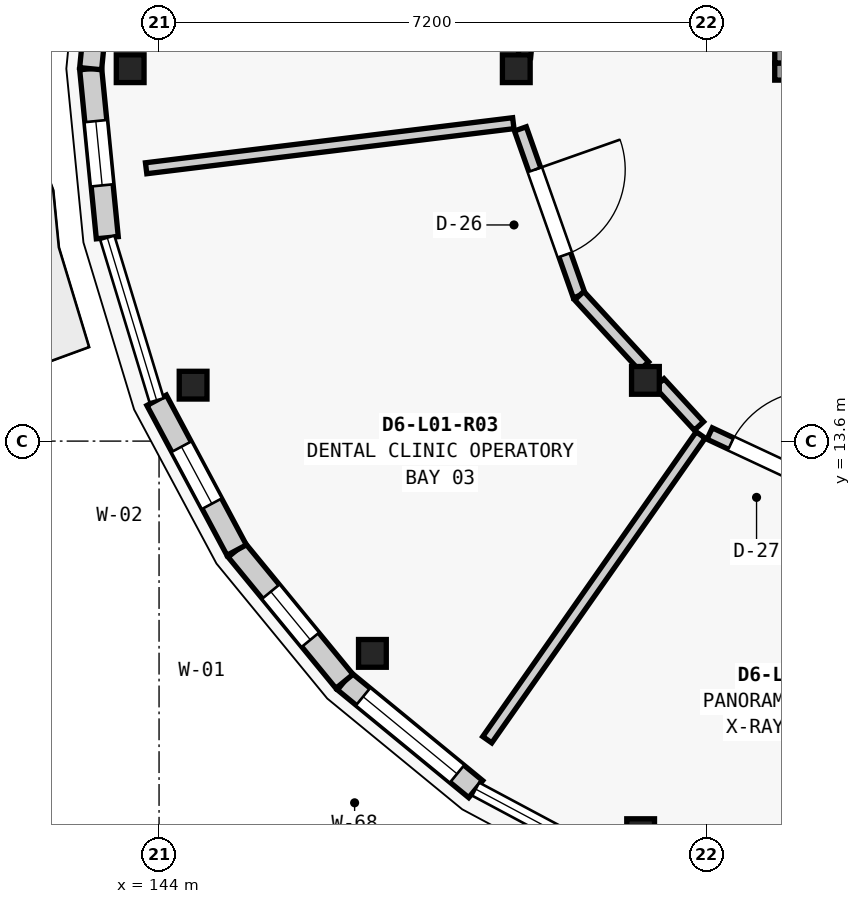
"""IFC4 building model, lengths in metres.
Left out: names, types, materials, properties, quantities, classifications, styles, units other than length and angle.
Written with IfcOpenShell. Run it as: python <this file> out.ifc"""

import sys

from ifc_helpers import new_model, si_unit, direction, frame, frame_2d, origin, origin_2d, place, context, subcontext, project, spatial, rectangle, extrude, element, fill, save


model = new_model("IFC4")
c1 = context("Model", 3, precision=1e-05, world=origin(), true_north=direction((0.0, 1.0)))
c2 = subcontext(c1, "Body", "Model", "MODEL_VIEW")
j1 = project(units=[si_unit("LENGTHUNIT", "METRE"), si_unit("PLANEANGLEUNIT", "RADIAN")], contexts=[c1])
p1 = place(None, origin())
s1 = spatial("IfcSite", under=j1, at=p1, CompositionType="ELEMENT")
p2 = place(p1, origin())
s2 = spatial("IfcBuilding", under=s1, at=p2, CompositionType="ELEMENT")
p3 = place(p2, frame((0.0, 0.0, 4.55)))
s3 = spatial("IfcBuildingStorey", under=s2, at=p3, CompositionType="ELEMENT", Elevation=4.55)
for number, where, z_axis, x_axis in (
    (1, (143.62, 18.5, 0.0), (0.0, 0.0, 1.0), (1.0, 0.0, 0.0)),
    (2, (144.448, 14.336, 0.0), (0.0, 0.0, 1.0), (1.0, 0.0, 0.0)),
    (3, (146.807, 10.807, 0.0), (0.0, 0.0, 1.0), (1.0, 0.0, 0.0)),
    (4, (150.336, 8.448, 0.0), (0.0, 0.0, 1.0), (1.0, 0.0, 0.0)),
    (5, (148.7, 18.5, 0.0), (0.0, 0.0, 1.0), (1.0, 0.0, 0.0)),
    (6, (150.399, 14.399, 0.0), (0.0, 0.0, 1.0), (1.0, 0.0, 0.0)),
):
    element("IfcColumn", number, at=place(p3, frame(where, z_axis=z_axis, x_axis=x_axis)), inside=s3, PredefinedType="COLUMN", context=c2, shape_type="SweptSolid", body=[
        extrude(rectangle(XDim=0.365, YDim=0.365, at=origin_2d()), origin(), (0.0, 0.0, 1.0), 4.2),
    ])
p4 = place(p3, frame((148.166, 9.021, 0.0), z_axis=(0.0, 0.0, 1.0), x_axis=(-0.772875513354, 0.63455767339, 0.0)))
e7 = element("IfcWall", 7, at=p4, inside=s3, PredefinedType="ELEMENTEDWALL", context=c2, shape_type="SweptSolid", body=[
    extrude(rectangle(XDim=2.235, YDim=0.29, at=frame_2d((1.117, 0.0))), origin(), (0.0, 0.0, 1.0), 3.309),
])
p5 = place(p4, frame((0.317, 0.0, 0.85)))
e8 = element("IfcOpeningElement", 8, at=p5, cuts=e7, PredefinedType="OPENING", context=c2, shape_type="SweptSolid", body=[
    extrude(rectangle(XDim=1.6, YDim=1.85, at=frame_2d((0.8, 0.925))), frame((0.0, 0.155, 0.0), z_axis=(0.0, -1.0, 0.0), x_axis=(1.0, 0.0, 0.0)), (0.0, 0.0, 1.0), 0.31),
])
p6 = place(p3, frame((146.439, 10.439, 0.0), z_axis=(0.0, 0.0, 1.0), x_axis=(-0.63455767339, 0.772875513354, 0.0)))
e9 = element("IfcWall", 9, at=p6, inside=s3, PredefinedType="ELEMENTEDWALL", context=c2, shape_type="SweptSolid", body=[
    extrude(rectangle(XDim=2.235, YDim=0.29, at=frame_2d((1.117, 0.0))), origin(), (0.0, 0.0, 1.0), 3.309),
])
p7 = place(p6, frame((0.707, 0.0, 0.85)))
e10 = element("IfcOpeningElement", 10, at=p7, cuts=e9, PredefinedType="OPENING", context=c2, shape_type="SweptSolid", body=[
    extrude(rectangle(XDim=0.82, YDim=1.45, at=frame_2d((0.41, 0.725))), frame((0.0, 0.155, 0.0), z_axis=(0.0, -1.0, 0.0), x_axis=(1.0, 0.0, 0.0)), (0.0, 0.0, 1.0), 0.31),
])
p8 = place(p3, frame((145.021, 12.166, 0.0), z_axis=(0.0, 0.0, 1.0), x_axis=(-0.471217561446, 0.882017012185, 0.0)))
e11 = element("IfcWall", 11, at=p8, inside=s3, PredefinedType="ELEMENTEDWALL", context=c2, shape_type="SweptSolid", body=[
    extrude(rectangle(XDim=2.235, YDim=0.29, at=frame_2d((1.117, 0.0))), origin(), (0.0, 0.0, 1.0), 3.309),
])
p9 = place(p8, frame((0.692, 0.0, 0.85)))
e12 = element("IfcOpeningElement", 12, at=p9, cuts=e11, PredefinedType="OPENING", context=c2, shape_type="SweptSolid", body=[
    extrude(rectangle(XDim=0.85, YDim=1.5, at=frame_2d((0.425, 0.75))), frame((0.0, 0.155, 0.0), z_axis=(0.0, -1.0, 0.0), x_axis=(1.0, 0.0, 0.0)), (0.0, 0.0, 1.0), 0.31),
])
p10 = place(p3, frame((143.319, 16.276, 0.0), z_axis=(0.0, 0.0, 1.0), x_axis=(-0.097989369151, 0.995187461503, 0.0)))
e13 = element("IfcWall", 13, at=p10, inside=s3, PredefinedType="ELEMENTEDWALL", context=c2, shape_type="SweptSolid", body=[
    extrude(rectangle(XDim=2.235, YDim=0.29, at=frame_2d((1.117, 0.0))), origin(), (0.0, 0.0, 1.0), 3.309),
])
p11 = place(p10, frame((0.692, 0.0, 0.85)))
e14 = element("IfcOpeningElement", 14, at=p11, cuts=e13, PredefinedType="OPENING", context=c2, shape_type="SweptSolid", body=[
    extrude(rectangle(XDim=0.85, YDim=1.75, at=frame_2d((0.425, 0.875))), frame((0.0, 0.155, 0.0), z_axis=(0.0, -1.0, 0.0), x_axis=(1.0, 0.0, 0.0)), (0.0, 0.0, 1.0), 0.31),
])
p12 = place(p3, frame((143.1, 18.5, 0.0), z_axis=(0.0, 0.0, 1.0), x_axis=(0.097989369151, 0.995187461503, 0.0)))
e15 = element("IfcWall", 15, at=p12, inside=s3, PredefinedType="ELEMENTEDWALL", context=c2, shape_type="SweptSolid", body=[
    extrude(rectangle(XDim=2.235, YDim=0.29, at=frame_2d((1.117, 0.0))), origin(), (0.0, 0.0, 1.0), 3.309),
])
p13 = place(p12, frame((0.677, 0.0, 0.85)))
e16 = element("IfcOpeningElement", 16, at=p13, cuts=e15, PredefinedType="OPENING", context=c2, shape_type="SweptSolid", body=[
    extrude(rectangle(XDim=0.88, YDim=1.6, at=frame_2d((0.44, 0.8))), frame((0.0, 0.155, 0.0), z_axis=(0.0, -1.0, 0.0), x_axis=(1.0, 0.0, 0.0)), (0.0, 0.0, 1.0), 0.31),
])
p14 = place(p3, frame((152.1, 18.462, 0.0), z_axis=(0.0, 0.0, 1.0), x_axis=(1.0, 0.0, 0.0)))
e17 = element("IfcWall", 17, at=p14, inside=s3, PredefinedType="SHEAR", context=c2, shape_type="SweptSolid", body=[
    extrude(rectangle(XDim=3.1, YDim=0.225, at=frame_2d((1.55, 0.0))), origin(), (0.0, 0.0, 1.0), 3.955),
])
p15 = place(p14, frame((0.95, 0.0, 0.0)))
e18 = element("IfcOpeningElement", 18, at=p15, cuts=e17, PredefinedType="OPENING", context=c2, shape_type="SweptSolid", body=[
    extrude(rectangle(XDim=1.2, YDim=2.2, at=frame_2d((0.6, 1.1))), frame((0.0, 0.123, 0.0), z_axis=(0.0, -1.0, 0.0), x_axis=(1.0, 0.0, 0.0)), (0.0, 0.0, 1.0), 0.245),
])
p16 = place(p3, frame((152.213, 18.575, 0.0), z_axis=(0.0, 0.0, 1.0), x_axis=(0.0, 1.0, 0.0)))
e19 = element("IfcWall", 19, at=p16, inside=s3, PredefinedType="SHEAR", context=c2, shape_type="SweptSolid", body=[
    extrude(rectangle(XDim=2.15, YDim=0.225, at=frame_2d((1.075, 0.0))), origin(), (0.0, 0.0, 1.0), 3.955),
])
p17 = place(p3, frame((148.661, 17.783, 0.0), z_axis=(0.0, 0.0, 1.0), x_axis=(-0.992549416304, -0.121842751918, 0.0)))
e20 = element("IfcWall", 20, at=p17, inside=s3, PredefinedType="PARTITIONING", context=c2, shape_type="SweptSolid", body=[
    extrude(rectangle(XDim=4.867, YDim=0.145, at=frame_2d((2.434, 0.0))), origin(), (0.0, 0.0, 1.0), 3.284),
])
p18 = place(p3, frame((151.126, 13.681, 0.0), z_axis=(0.0, 0.0, 1.0), x_axis=(-0.573579487823, -0.819149907617, 0.0)))
e21 = element("IfcWall", 21, at=p18, inside=s3, PredefinedType="PARTITIONING", context=c2, shape_type="SweptSolid", body=[
    extrude(rectangle(XDim=4.895, YDim=0.145, at=frame_2d((2.448, 0.0))), origin(), (0.0, 0.0, 1.0), 3.284),
])
p19 = place(p3, frame((148.953, 20.196, 0.0), z_axis=(0.0, 0.0, 1.0), x_axis=(-0.094258636882, -0.995547743392, 0.0)))
e22 = element("IfcWall", 22, at=p19, inside=s3, PredefinedType="PARTITIONING", context=c2, shape_type="SweptSolid", body=[
    extrude(rectangle(XDim=1.549, YDim=0.165, at=frame_2d((0.774, 0.0))), origin(), (0.0, 0.0, 1.0), 3.284),
])
p20 = place(p3, frame((148.754, 17.708, 0.0), z_axis=(0.0, 0.0, 1.0), x_axis=(0.332606133603, -0.943065830093, 0.0)))
e23 = element("IfcWall", 23, at=p20, inside=s3, PredefinedType="PARTITIONING", context=c2, shape_type="SweptSolid", body=[
    extrude(rectangle(XDim=2.328, YDim=0.165, at=frame_2d((1.164, 0.0))), origin(), (0.0, 0.0, 1.0), 3.284),
])
p21 = place(p20, frame((0.569, 0.0, 0.0)))
e24 = element("IfcOpeningElement", 24, at=p21, cuts=e23, PredefinedType="OPENING", context=c2, shape_type="SweptSolid", body=[
    extrude(rectangle(XDim=1.19, YDim=2.26, at=frame_2d((0.595, 1.13))), frame((0.0, 0.093, 0.0), z_axis=(0.0, -1.0, 0.0), x_axis=(1.0, 0.0, 0.0)), (0.0, 0.0, 1.0), 0.185),
])
p22 = place(p3, frame((149.528, 15.513, 0.0), z_axis=(0.0, 0.0, 1.0), x_axis=(0.676611080709, -0.736340577085, 0.0)))
e25 = element("IfcWall", 25, at=p22, inside=s3, PredefinedType="PARTITIONING", context=c2, shape_type="SweptSolid", body=[
    extrude(rectangle(XDim=1.259, YDim=0.165, at=frame_2d((0.629, 0.0))), origin(), (0.0, 0.0, 1.0), 3.284),
])
p23 = place(p3, frame((150.583, 14.365, 0.0), z_axis=(0.0, 0.0, 1.0), x_axis=(0.676615979647, -0.736336075503, 0.0)))
e26 = element("IfcWall", 26, at=p23, inside=s3, PredefinedType="PARTITIONING", context=c2, shape_type="SweptSolid", body=[
    extrude(rectangle(XDim=0.769, YDim=0.165, at=frame_2d((0.384, 0.0))), origin(), (0.0, 0.0, 1.0), 3.284),
])
p24 = place(p3, frame((151.244, 13.7, 0.0), z_axis=(0.0, 0.0, 1.0), x_axis=(0.905838456469, -0.423623288763, 0.0)))
e27 = element("IfcWall", 27, at=p24, inside=s3, PredefinedType="PARTITIONING", context=c2, shape_type="SweptSolid", body=[
    extrude(rectangle(XDim=1.829, YDim=0.165, at=frame_2d((0.915, 0.0))), origin(), (0.0, 0.0, 1.0), 3.284),
])
p25 = place(p24, frame((0.31, 0.0, 0.0)))
e28 = element("IfcOpeningElement", 28, at=p25, cuts=e27, PredefinedType="OPENING", context=c2, shape_type="SweptSolid", body=[
    extrude(rectangle(XDim=1.21, YDim=2.16, at=frame_2d((0.605, 1.08))), frame((0.0, 0.093, 0.0), z_axis=(0.0, -1.0, 0.0), x_axis=(1.0, 0.0, 0.0)), (0.0, 0.0, 1.0), 0.185),
])
p26 = place(p5, origin())
e29 = element("IfcWindow", 29, at=p26, inside=s3, PartitioningType="SINGLE_PANEL", PredefinedType="WINDOW", context=c2, shape_type="SweptSolid", body=[
    extrude(rectangle(XDim=1.6, YDim=1.85, at=frame_2d((0.8, 0.925))), frame((0.0, 0.03, 0.0), z_axis=(0.0, -1.0, 0.0), x_axis=(1.0, 0.0, 0.0)), (0.0, 0.0, 1.0), 0.06),
])
fill(e8, e29)
p27 = place(p7, origin())
e30 = element("IfcWindow", 30, at=p27, inside=s3, PartitioningType="SINGLE_PANEL", PredefinedType="WINDOW", context=c2, shape_type="SweptSolid", body=[
    extrude(rectangle(XDim=0.82, YDim=1.45, at=frame_2d((0.41, 0.725))), frame((0.0, 0.03, 0.0), z_axis=(0.0, -1.0, 0.0), x_axis=(1.0, 0.0, 0.0)), (0.0, 0.0, 1.0), 0.06),
])
fill(e10, e30)
p28 = place(p9, origin())
e31 = element("IfcWindow", 31, at=p28, inside=s3, PartitioningType="SINGLE_PANEL", PredefinedType="WINDOW", context=c2, shape_type="SweptSolid", body=[
    extrude(rectangle(XDim=0.85, YDim=1.5, at=frame_2d((0.425, 0.75))), frame((0.0, 0.03, 0.0), z_axis=(0.0, -1.0, 0.0), x_axis=(1.0, 0.0, 0.0)), (0.0, 0.0, 1.0), 0.06),
])
fill(e12, e31)
p29 = place(p11, origin())
e32 = element("IfcWindow", 32, at=p29, inside=s3, PartitioningType="SINGLE_PANEL", PredefinedType="WINDOW", context=c2, shape_type="SweptSolid", body=[
    extrude(rectangle(XDim=0.85, YDim=1.75, at=frame_2d((0.425, 0.875))), frame((0.0, 0.03, 0.0), z_axis=(0.0, -1.0, 0.0), x_axis=(1.0, 0.0, 0.0)), (0.0, 0.0, 1.0), 0.06),
])
fill(e14, e32)
p30 = place(p21, origin())
e33 = element("IfcDoor", 33, at=p30, inside=s3, OperationType="SINGLE_SWING_LEFT", PredefinedType="DOOR", context=c2, shape_type="SweptSolid", body=[
    extrude(rectangle(XDim=1.19, YDim=2.26, at=frame_2d((0.595, 1.13))), frame((0.0, 0.025, 0.0), z_axis=(0.0, -1.0, 0.0), x_axis=(1.0, 0.0, 0.0)), (0.0, 0.0, 1.0), 0.05),
])
fill(e24, e33)
p31 = place(p25, origin())
e34 = element("IfcDoor", 34, at=p31, inside=s3, OperationType="SINGLE_SWING_RIGHT", PredefinedType="DOOR", context=c2, shape_type="SweptSolid", body=[
    extrude(rectangle(XDim=1.21, YDim=2.16, at=frame_2d((0.605, 1.08))), frame((0.0, 0.025, 0.0), z_axis=(0.0, -1.0, 0.0), x_axis=(1.0, 0.0, 0.0)), (0.0, 0.0, 1.0), 0.05),
])
fill(e28, e34)
save(model, sys.argv[1])
